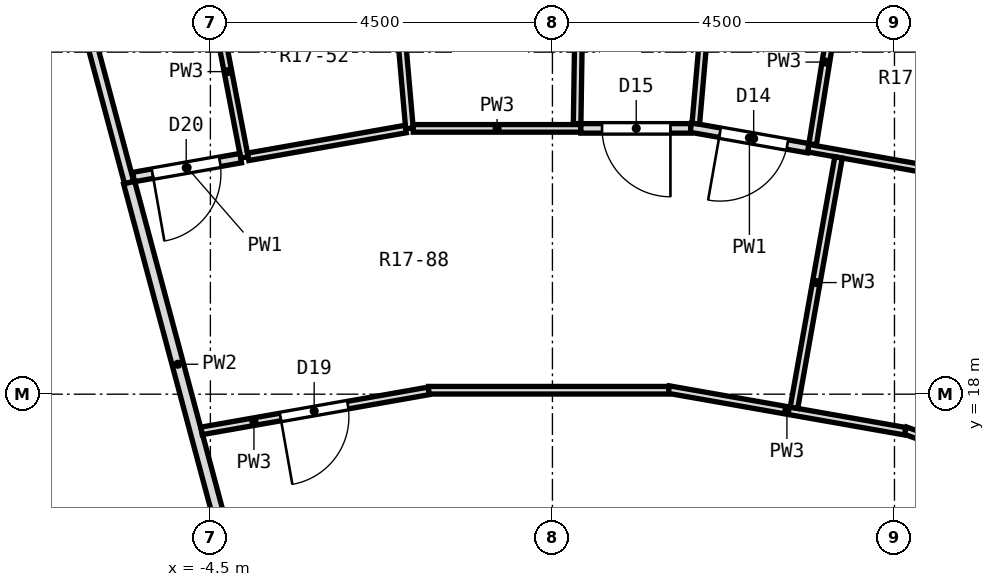
"""IFC4 building model, lengths in metres.
Left out: names, types, materials, properties, quantities, classifications, styles, units other than length and angle.
Written with IfcOpenShell. Run it as: python <this file> out.ifc"""

import sys

from ifc_helpers import new_model, si_unit, direction, frame, frame_2d, origin, place, context, subcontext, project, spatial, rectangle, extrude, element, fill, save


model = new_model("IFC4")
c1 = context("Model", 3, precision=1e-05, world=origin(), true_north=direction((0.0, 1.0)))
c2 = subcontext(c1, "Body", "Model", "MODEL_VIEW")
j1 = project(units=[si_unit("LENGTHUNIT", "METRE"), si_unit("PLANEANGLEUNIT", "RADIAN")], contexts=[c1])
p1 = place(None, origin())
s1 = spatial("IfcSite", under=j1, at=p1, CompositionType="ELEMENT")
p2 = place(p1, origin())
s2 = spatial("IfcBuilding", under=s1, at=p2, CompositionType="ELEMENT")
p3 = place(p2, frame((0.0, 0.0, 91.9)))
s3 = spatial("IfcBuildingStorey", under=s2, at=p3, CompositionType="ELEMENT", Elevation=91.9)
p4 = place(p3, frame((-2.237, 25.567, 0.0), z_axis=(0.0, 0.0, 1.0), x_axis=(0.087060211484, -0.996203051379, 0.0)))
e1 = element("IfcWall", 1, at=p4, inside=s3, PredefinedType="PARTITIONING", context=c2, shape_type="SweptSolid", body=[
    extrude(rectangle(XDim=4.086, YDim=0.1, at=frame_2d((2.043, 0.0))), origin(), (0.0, 0.0, 1.0), 2.8),
])
p5 = place(p3, frame((-4.486, 23.373, 0.0), z_axis=(0.0, 0.0, 1.0), x_axis=(0.188701744684, -0.982034445197, 0.0)))
e2 = element("IfcWall", 2, at=p5, inside=s3, PredefinedType="PARTITIONING", context=c2, shape_type="SweptSolid", body=[
    extrude(rectangle(XDim=2.3, YDim=0.1, at=frame_2d((1.15, 0.0))), origin(), (0.0, 0.0, 1.0), 2.8),
])
p6 = place(p3, frame((-6.642, 24.791, 0.0), z_axis=(0.0, 0.0, 1.0), x_axis=(0.258787077678, -0.965934391368, 0.0)))
e3 = element("IfcWall", 3, at=p6, inside=s3, PredefinedType="PARTITIONING", context=c2, shape_type="SweptSolid", body=[
    extrude(rectangle(XDim=4.148, YDim=0.125, at=frame_2d((2.074, 0.0))), origin(), (0.0, 0.0, 1.0), 2.8),
])
p7 = place(p3, frame((-5.569, 20.784, 0.0), z_axis=(0.0, 0.0, 1.0), x_axis=(0.258810886784, -0.965928012267, 0.0)))
e4 = element("IfcWall", 4, at=p7, inside=s3, PredefinedType="PARTITIONING", context=c2, shape_type="SweptSolid", body=[
    extrude(rectangle(XDim=4.949, YDim=0.15, at=frame_2d((2.474, 0.0))), origin(), (0.0, 0.0, 1.0), 2.8),
])
p8 = place(p3, frame((4.642, 17.521, 0.0), z_axis=(0.0, 0.0, 1.0), x_axis=(0.939739258447, -0.341891980211, 0.0)))
e5 = element("IfcWall", 5, at=p8, inside=s3, PredefinedType="PARTITIONING", context=c2, shape_type="SweptSolid", body=[
    extrude(rectangle(XDim=3.159, YDim=0.1, at=frame_2d((1.58, 0.0))), origin(), (0.0, 0.0, 1.0), 2.8),
])
p9 = place(p8, frame((1.18, 0.0, 0.0)))
e6 = element("IfcOpeningElement", 6, at=p9, cuts=e5, PredefinedType="OPENING", context=c2, shape_type="SweptSolid", body=[
    extrude(rectangle(XDim=0.9, YDim=2.1, at=frame_2d((0.45, 1.05))), frame((0.0, 0.062, 0.0), z_axis=(0.0, -1.0, 0.0), x_axis=(1.0, 0.0, 0.0)), (0.0, 0.0, 1.0), 0.124),
])
p10 = place(p3, frame((3.365, 21.236, 0.0), z_axis=(0.0, 0.0, 1.0), x_axis=(0.98465059855, -0.174537098562, 0.0)))
e7 = element("IfcWall", 7, at=p10, inside=s3, PredefinedType="PARTITIONING", context=c2, shape_type="SweptSolid", body=[
    extrude(rectangle(XDim=2.205, YDim=0.1, at=frame_2d((1.102, 0.0))), origin(), (0.0, 0.0, 1.0), 2.8),
])
p11 = place(p3, frame((1.529, 18.061, 0.0), z_axis=(0.0, 0.0, 1.0), x_axis=(0.984824759837, -0.173551699537, 0.0)))
e8 = element("IfcWall", 8, at=p11, inside=s3, PredefinedType="PARTITIONING", context=c2, shape_type="SweptSolid", body=[
    extrude(rectangle(XDim=3.159, YDim=0.1, at=frame_2d((1.58, 0.0))), origin(), (0.0, 0.0, 1.0), 2.8),
])
p12 = place(p3, frame((1.819, 21.508, 0.0), z_axis=(0.0, 0.0, 1.0), x_axis=(0.984825798369, -0.17354580625, 0.0)))
e9 = element("IfcWall", 9, at=p12, inside=s3, PredefinedType="PARTITIONING", context=c2, shape_type="SweptSolid", body=[
    extrude(rectangle(XDim=1.57, YDim=0.125, at=frame_2d((0.785, 0.0))), origin(), (0.0, 0.0, 1.0), 2.8),
])
p13 = place(p12, frame((0.392, 0.0, 0.0)))
e10 = element("IfcOpeningElement", 10, at=p13, cuts=e9, PredefinedType="OPENING", context=c2, shape_type="SweptSolid", body=[
    extrude(rectangle(XDim=0.9, YDim=2.1, at=frame_2d((0.45, 1.05))), frame((0.0, 0.074, 0.0), z_axis=(0.0, -1.0, 0.0), x_axis=(1.0, 0.0, 0.0)), (0.0, 0.0, 1.0), 0.149),
])
p14 = place(p3, frame((-1.63, 18.052, 0.0), z_axis=(0.0, 0.0, 1.0), x_axis=(1.0, 0.0, 0.0)))
e11 = element("IfcWall", 11, at=p14, inside=s3, PredefinedType="PARTITIONING", context=c2, shape_type="SweptSolid", body=[
    extrude(rectangle(XDim=3.159, YDim=0.1, at=frame_2d((1.58, 0.0))), origin(), (0.0, 0.0, 1.0), 2.8),
])
p15 = place(p3, frame((-1.831, 21.497, 0.0), z_axis=(0.0, 0.0, 1.0), x_axis=(1.0, 0.0, 0.0)))
e12 = element("IfcWall", 12, at=p15, inside=s3, PredefinedType="PARTITIONING", context=c2, shape_type="SweptSolid", body=[
    extrude(rectangle(XDim=2.205, YDim=0.1, at=frame_2d((1.103, 0.0))), origin(), (0.0, 0.0, 1.0), 2.8),
])
p16 = place(p3, frame((0.374, 21.497, 0.0), z_axis=(0.0, 0.0, 1.0), x_axis=(1.0, 0.0, 0.0)))
e13 = element("IfcWall", 13, at=p16, inside=s3, PredefinedType="PARTITIONING", context=c2, shape_type="SweptSolid", body=[
    extrude(rectangle(XDim=1.445, YDim=0.125, at=frame_2d((0.722, 0.0))), origin(), (0.0, 0.0, 1.0), 2.8),
])
p17 = place(p16, frame((0.279, 0.0, 0.0)))
e14 = element("IfcOpeningElement", 14, at=p17, cuts=e13, PredefinedType="OPENING", context=c2, shape_type="SweptSolid", body=[
    extrude(rectangle(XDim=0.9, YDim=2.1, at=frame_2d((0.45, 1.05))), frame((0.0, 0.074, 0.0), z_axis=(0.0, -1.0, 0.0), x_axis=(1.0, 0.0, 0.0)), (0.0, 0.0, 1.0), 0.149),
])
p18 = place(p3, frame((-4.616, 17.517, 0.0), z_axis=(0.0, 0.0, 1.0), x_axis=(0.984849913621, 0.173408903003, 0.0)))
e15 = element("IfcWall", 15, at=p18, inside=s3, PredefinedType="PARTITIONING", context=c2, shape_type="SweptSolid", body=[
    extrude(rectangle(XDim=3.034, YDim=0.1, at=frame_2d((1.517, 0.0))), origin(), (0.0, 0.0, 1.0), 2.8),
])
p19 = place(p18, frame((1.054, 0.0, 0.0)))
e16 = element("IfcOpeningElement", 16, at=p19, cuts=e15, PredefinedType="OPENING", context=c2, shape_type="SweptSolid", body=[
    extrude(rectangle(XDim=0.9, YDim=2.1, at=frame_2d((0.45, 1.05))), frame((0.0, 0.062, 0.0), z_axis=(0.0, -1.0, 0.0), x_axis=(1.0, 0.0, 0.0)), (0.0, 0.0, 1.0), 0.124),
])
p20 = place(p3, frame((-4.003, 21.123, 0.0), z_axis=(0.0, 0.0, 1.0), x_axis=(0.984804573467, 0.173666208797, 0.0)))
e17 = element("IfcWall", 17, at=p20, inside=s3, PredefinedType="PARTITIONING", context=c2, shape_type="SweptSolid", body=[
    extrude(rectangle(XDim=2.104, YDim=0.1, at=frame_2d((1.052, 0.0))), origin(), (0.0, 0.0, 1.0), 2.8),
])
p21 = place(p3, frame((-5.511, 20.857, 0.0), z_axis=(0.0, 0.0, 1.0), x_axis=(0.984845301527, 0.173435094659, 0.0)))
e18 = element("IfcWall", 18, at=p21, inside=s3, PredefinedType="PARTITIONING", context=c2, shape_type="SweptSolid", body=[
    extrude(rectangle(XDim=1.432, YDim=0.125, at=frame_2d((0.716, 0.0))), origin(), (0.0, 0.0, 1.0), 2.8),
])
p22 = place(p21, frame((0.254, 0.0, 0.0)))
e19 = element("IfcOpeningElement", 19, at=p22, cuts=e18, PredefinedType="OPENING", context=c2, shape_type="SweptSolid", body=[
    extrude(rectangle(XDim=0.9, YDim=2.1, at=frame_2d((0.45, 1.05))), frame((0.0, 0.074, 0.0), z_axis=(0.0, -1.0, 0.0), x_axis=(1.0, 0.0, 0.0)), (0.0, 0.0, 1.0), 0.149),
])
p23 = place(p3, frame((3.178, 17.821, 0.0), z_axis=(0.0, 0.0, 1.0), x_axis=(0.175313184309, 0.984512715716, 0.0)))
e20 = element("IfcWall", 20, at=p23, inside=s3, PredefinedType="PARTITIONING", context=c2, shape_type="SweptSolid", body=[
    extrude(rectangle(XDim=3.345, YDim=0.1, at=frame_2d((1.672, 0.0))), origin(), (0.0, 0.0, 1.0), 2.8),
])
p24 = place(p3, frame((3.424, 21.289, 0.0), z_axis=(0.0, 0.0, 1.0), x_axis=(0.1586042635, 0.987342234283, 0.0)))
e21 = element("IfcWall", 21, at=p24, inside=s3, PredefinedType="PARTITIONING", context=c2, shape_type="SweptSolid", body=[
    extrude(rectangle(XDim=2.187, YDim=0.1, at=frame_2d((1.094, 0.0))), origin(), (0.0, 0.0, 1.0), 2.8),
])
p25 = place(p3, frame((1.886, 21.559, 0.0), z_axis=(0.0, 0.0, 1.0), x_axis=(0.087137593131, 0.996196285811, 0.0)))
e22 = element("IfcWall", 22, at=p25, inside=s3, PredefinedType="PARTITIONING", context=c2, shape_type="SweptSolid", body=[
    extrude(rectangle(XDim=4.023, YDim=0.1, at=frame_2d((2.012, 0.0))), origin(), (0.0, 0.0, 1.0), 2.8),
])
p26 = place(p3, frame((0.325, 21.56, 0.0), z_axis=(0.0, 0.0, 1.0), x_axis=(0.015176823242, 0.999884825386, 0.0)))
e23 = element("IfcWall", 23, at=p26, inside=s3, PredefinedType="PARTITIONING", context=c2, shape_type="SweptSolid", body=[
    extrude(rectangle(XDim=2.188, YDim=0.1, at=frame_2d((1.094, 0.0))), origin(), (0.0, 0.0, 1.0), 2.8),
])
p27 = place(p13, frame((0.9, 0.0, 0.0), z_axis=(0.0, 0.0, 1.0), x_axis=(-1.0, 0.0, 0.0)))
e24 = element("IfcDoor", 24, at=p27, inside=s3, OperationType="SINGLE_SWING_RIGHT", PredefinedType="DOOR", context=c2, shape_type="SweptSolid", body=[
    extrude(rectangle(XDim=0.9, YDim=2.1, at=frame_2d((0.45, 1.05))), frame((0.0, 0.025, 0.0), z_axis=(0.0, -1.0, 0.0), x_axis=(1.0, 0.0, 0.0)), (0.0, 0.0, 1.0), 0.05),
])
fill(e10, e24)
p28 = place(p17, frame((0.9, 0.0, 0.0), z_axis=(0.0, 0.0, 1.0), x_axis=(-1.0, 0.0, 0.0)))
e25 = element("IfcDoor", 25, at=p28, inside=s3, OperationType="SINGLE_SWING_LEFT", PredefinedType="DOOR", context=c2, shape_type="SweptSolid", body=[
    extrude(rectangle(XDim=0.9, YDim=2.1, at=frame_2d((0.45, 1.05))), frame((0.0, 0.025, 0.0), z_axis=(0.0, -1.0, 0.0), x_axis=(1.0, 0.0, 0.0)), (0.0, 0.0, 1.0), 0.05),
])
fill(e14, e25)
p29 = place(p19, frame((0.9, 0.0, 0.0), z_axis=(0.0, 0.0, 1.0), x_axis=(-1.0, 0.0, 0.0)))
e26 = element("IfcDoor", 26, at=p29, inside=s3, OperationType="SINGLE_SWING_RIGHT", PredefinedType="DOOR", context=c2, shape_type="SweptSolid", body=[
    extrude(rectangle(XDim=0.9, YDim=2.1, at=frame_2d((0.45, 1.05))), frame((0.0, 0.025, 0.0), z_axis=(0.0, -1.0, 0.0), x_axis=(1.0, 0.0, 0.0)), (0.0, 0.0, 1.0), 0.05),
])
fill(e16, e26)
p30 = place(p22, frame((0.9, 0.0, 0.0), z_axis=(0.0, 0.0, 1.0), x_axis=(-1.0, 0.0, 0.0)))
e27 = element("IfcDoor", 27, at=p30, inside=s3, OperationType="SINGLE_SWING_RIGHT", PredefinedType="DOOR", context=c2, shape_type="SweptSolid", body=[
    extrude(rectangle(XDim=0.9, YDim=2.1, at=frame_2d((0.45, 1.05))), frame((0.0, 0.025, 0.0), z_axis=(0.0, -1.0, 0.0), x_axis=(1.0, 0.0, 0.0)), (0.0, 0.0, 1.0), 0.05),
])
fill(e19, e27)
save(model, sys.argv[1])
